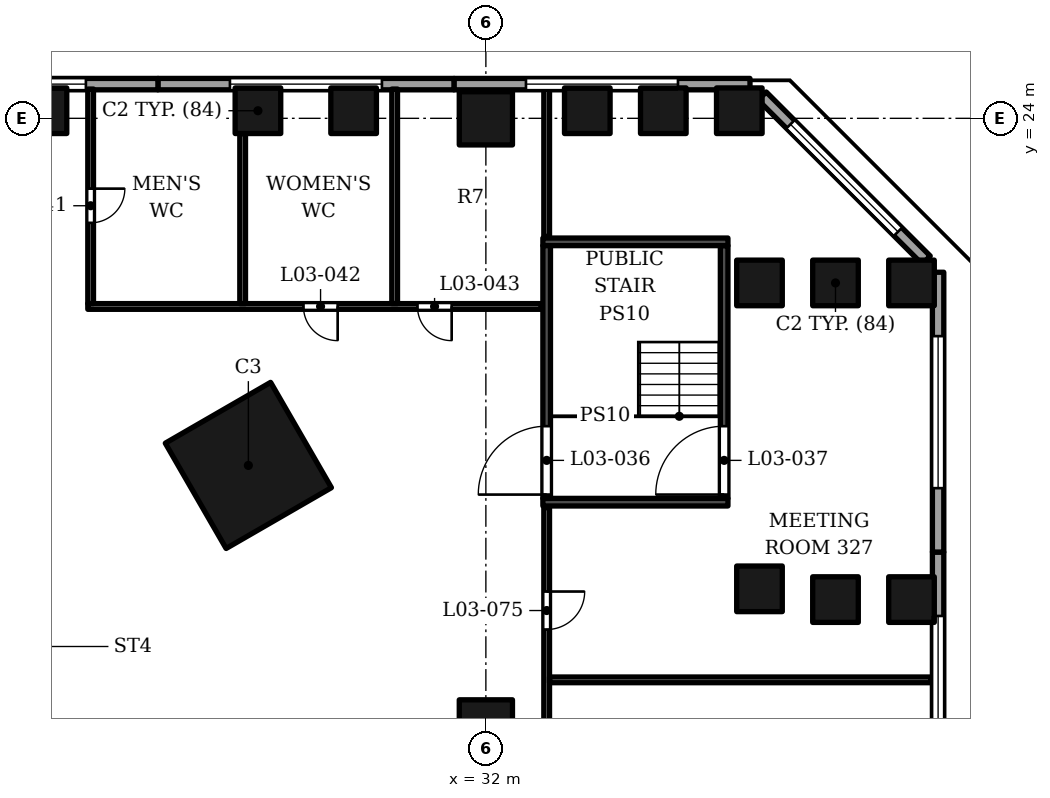
"""IFC4 building model, lengths in metres.
Left out: names, types, materials, properties, quantities, classifications, styles, units other than length and angle.
Written with IfcOpenShell. Run it as: python <this file> out.ifc"""

import sys

from ifc_helpers import new_model, si_unit, direction, frame, frame_2d, origin, origin_2d, place, context, subcontext, project, spatial, rectangle, extrude, element, fill, save


model = new_model("IFC4")
c1 = context("Model", 3, precision=1e-05, world=origin(), true_north=direction((0.0, 1.0)))
c2 = subcontext(c1, "Body", "Model", "MODEL_VIEW")
j1 = project(units=[si_unit("LENGTHUNIT", "METRE"), si_unit("PLANEANGLEUNIT", "RADIAN")], contexts=[c1])
p1 = place(None, origin())
s1 = spatial("IfcSite", under=j1, at=p1, CompositionType="ELEMENT")
p2 = place(p1, origin())
s2 = spatial("IfcBuilding", under=s1, at=p2, CompositionType="ELEMENT")
p3 = place(p2, frame((0.0, 0.0, 29.0)))
s3 = spatial("IfcBuildingStorey", under=s2, at=p3, CompositionType="ELEMENT", Elevation=29.0)
for number, where, z_axis, x_axis in (
    (1, (32.0, 8.0, 0.0), (0.0, 0.0, 1.0), (1.0, 0.0, 0.0)),
    (2, (32.0, 24.0, 0.0), (0.0, 0.0, 1.0), (1.0, 0.0, 0.0)),
):
    element("IfcColumn", number, at=place(p3, frame(where, z_axis=z_axis, x_axis=x_axis)), inside=s3, PredefinedType="COLUMN", context=c2, shape_type="SweptSolid", body=[
        extrude(rectangle(XDim=1.4, YDim=1.4, at=origin_2d()), origin(), (0.0, 0.0, 1.0), 5.5),
    ])
for number, where, z_axis, x_axis in (
    (3, (34.669, 24.2, 0.0), (0.0, 0.0, 1.0), (1.0, 0.0, 0.0)),
    (4, (39.2, 19.669, 0.0), (0.0, 0.0, 1.0), (1.0, 0.0, 0.0)),
    (5, (26.002, 24.2, 0.0), (0.0, 0.0, 1.0), (1.0, 0.0, 0.0)),
    (6, (39.2, 11.62, 0.0), (0.0, 0.0, 1.0), (1.0, 0.0, 0.0)),
    (7, (36.669, 24.2, 0.0), (0.0, 0.0, 1.0), (1.0, 0.0, 0.0)),
    (8, (41.2, 19.669, 0.0), (0.0, 0.0, 1.0), (1.0, 0.0, 0.0)),
    (9, (20.372, 24.2, 0.0), (0.0, 0.0, 1.0), (1.0, 0.0, 0.0)),
    (10, (28.52, 24.2, 0.0), (0.0, 0.0, 1.0), (1.0, 0.0, 0.0)),
    (11, (41.2, 11.337, 0.0), (0.0, 0.0, 1.0), (1.0, 0.0, 0.0)),
    (12, (38.669, 24.2, 0.0), (0.0, 0.0, 1.0), (1.0, 0.0, 0.0)),
    (13, (43.2, 19.669, 0.0), (0.0, 0.0, 1.0), (1.0, 0.0, 0.0)),
    (14, (43.2, 11.337, 0.0), (0.0, 0.0, 1.0), (1.0, 0.0, 0.0)),
):
    element("IfcColumn", number, at=place(p3, frame(where, z_axis=z_axis, x_axis=x_axis)), inside=s3, PredefinedType="COLUMN", context=c2, shape_type="SweptSolid", body=[
        extrude(rectangle(XDim=1.2, YDim=1.2, at=origin_2d()), origin(), (0.0, 0.0, 1.0), 5.5),
    ])
p4 = place(p3, frame((25.75, 14.867, 0.0), z_axis=(0.0, 0.0, 1.0), x_axis=(-0.866025386331, -0.50000003023, 0.0)))
e15 = element("IfcColumn", 15, at=p4, inside=s3, PredefinedType="COLUMN", context=c2, shape_type="SweptSolid", body=[
    extrude(rectangle(XDim=3.2, YDim=3.2, at=origin_2d()), origin(), (0.0, 0.0, 1.0), 5.5),
])
p5 = place(p3, frame((43.9, 5.225, 0.0), z_axis=(0.0, 0.0, 1.0), x_axis=(0.0, 1.0, 0.0)))
e16 = element("IfcWall", 16, at=p5, inside=s3, PredefinedType="SOLIDWALL", context=c2, shape_type="SweptSolid", body=[
    extrude(rectangle(XDim=7.362, YDim=0.3, at=frame_2d((3.681, 0.0))), origin(), (0.0, 0.0, 1.0), 4.1),
])
p6 = place(p5, frame((1.681, 0.0, 1.0)))
e17 = element("IfcOpeningElement", 17, at=p6, cuts=e16, PredefinedType="OPENING", context=c2, shape_type="SweptSolid", body=[
    extrude(rectangle(XDim=4.0, YDim=1.8, at=frame_2d((2.0, 0.9))), frame((0.0, 0.16, 0.0), z_axis=(0.0, -1.0, 0.0), x_axis=(1.0, 0.0, 0.0)), (0.0, 0.0, 1.0), 0.32),
])
p7 = place(p3, frame((43.9, 12.587, 0.0), z_axis=(0.0, 0.0, 1.0), x_axis=(0.0, 1.0, 0.0)))
e18 = element("IfcWall", 18, at=p7, inside=s3, PredefinedType="SOLIDWALL", context=c2, shape_type="SweptSolid", body=[
    extrude(rectangle(XDim=7.363, YDim=0.3, at=frame_2d((3.681, 0.0))), origin(), (0.0, 0.0, 1.0), 4.1),
])
p8 = place(p7, frame((1.681, 0.0, 1.0)))
e19 = element("IfcOpeningElement", 19, at=p8, cuts=e18, PredefinedType="OPENING", context=c2, shape_type="SweptSolid", body=[
    extrude(rectangle(XDim=4.0, YDim=1.8, at=frame_2d((2.0, 0.9))), frame((0.0, 0.16, 0.0), z_axis=(0.0, -1.0, 0.0), x_axis=(1.0, 0.0, 0.0)), (0.0, 0.0, 1.0), 0.32),
])
p9 = place(p3, frame((43.588, 20.271, 0.0), z_axis=(0.0, 0.0, 1.0), x_axis=(-0.707106781187, 0.707106781187, 0.0)))
e20 = element("IfcWall", 20, at=p9, inside=s3, PredefinedType="SOLIDWALL", context=c2, shape_type="SweptSolid", body=[
    extrude(rectangle(XDim=6.105, YDim=0.3, at=frame_2d((3.052, 0.0))), origin(), (0.0, 0.0, 1.0), 4.1),
])
p10 = place(p9, frame((1.052, 0.0, 1.0)))
e21 = element("IfcOpeningElement", 21, at=p10, cuts=e20, PredefinedType="OPENING", context=c2, shape_type="SweptSolid", body=[
    extrude(rectangle(XDim=4.0, YDim=1.8, at=frame_2d((2.0, 0.9))), frame((0.0, 0.16, 0.0), z_axis=(0.0, -1.0, 0.0), x_axis=(1.0, 0.0, 0.0)), (0.0, 0.0, 1.0), 0.32),
])
p11 = place(p3, frame((38.95, 24.9, 0.0), z_axis=(0.0, 0.0, 1.0), x_axis=(-1.0, 0.0, 0.0)))
e22 = element("IfcWall", 22, at=p11, inside=s3, PredefinedType="SOLIDWALL", context=c2, shape_type="SweptSolid", body=[
    extrude(rectangle(XDim=7.79, YDim=0.3, at=frame_2d((3.895, 0.0))), origin(), (0.0, 0.0, 1.0), 4.1),
])
p12 = place(p11, frame((1.895, 0.0, 1.0)))
e23 = element("IfcOpeningElement", 23, at=p12, cuts=e22, PredefinedType="OPENING", context=c2, shape_type="SweptSolid", body=[
    extrude(rectangle(XDim=4.0, YDim=1.8, at=frame_2d((2.0, 0.9))), frame((0.0, 0.16, 0.0), z_axis=(0.0, -1.0, 0.0), x_axis=(1.0, 0.0, 0.0)), (0.0, 0.0, 1.0), 0.32),
])
p13 = place(p3, frame((31.16, 24.9, 0.0), z_axis=(0.0, 0.0, 1.0), x_axis=(-1.0, 0.0, 0.0)))
e24 = element("IfcWall", 24, at=p13, inside=s3, PredefinedType="SOLIDWALL", context=c2, shape_type="SweptSolid", body=[
    extrude(rectangle(XDim=7.79, YDim=0.3, at=frame_2d((3.895, 0.0))), origin(), (0.0, 0.0, 1.0), 4.1),
])
p14 = place(p13, frame((1.895, 0.0, 1.0)))
e25 = element("IfcOpeningElement", 25, at=p14, cuts=e24, PredefinedType="OPENING", context=c2, shape_type="SweptSolid", body=[
    extrude(rectangle(XDim=4.0, YDim=1.8, at=frame_2d((2.0, 0.9))), frame((0.0, 0.16, 0.0), z_axis=(0.0, -1.0, 0.0), x_axis=(1.0, 0.0, 0.0)), (0.0, 0.0, 1.0), 0.32),
])
p15 = place(p3, frame((23.37, 24.9, 0.0), z_axis=(0.0, 0.0, 1.0), x_axis=(-1.0, 0.0, 0.0)))
e26 = element("IfcWall", 26, at=p15, inside=s3, PredefinedType="SOLIDWALL", context=c2, shape_type="SweptSolid", body=[
    extrude(rectangle(XDim=7.79, YDim=0.3, at=frame_2d((3.895, 0.0))), origin(), (0.0, 0.0, 1.0), 4.1),
])
p16 = place(p15, frame((1.895, 0.0, 1.0)))
e27 = element("IfcOpeningElement", 27, at=p16, cuts=e26, PredefinedType="OPENING", context=c2, shape_type="SweptSolid", body=[
    extrude(rectangle(XDim=4.0, YDim=1.8, at=frame_2d((2.0, 0.9))), frame((0.0, 0.16, 0.0), z_axis=(0.0, -1.0, 0.0), x_axis=(1.0, 0.0, 0.0)), (0.0, 0.0, 1.0), 0.32),
])
p17 = place(p3, frame((43.85, 5.302, 5.5), z_axis=(0.0, 0.0, 1.0), x_axis=(0.0, 1.0, 0.0)))
e28 = element("IfcWall", 28, at=p17, inside=s3, PredefinedType="PARAPET", context=c2, shape_type="SweptSolid", body=[
    extrude(rectangle(XDim=14.698, YDim=0.3, at=frame_2d((7.349, 0.0))), origin(), (0.0, 0.0, 1.0), 1.1),
])
p18 = place(p3, frame((43.745, 20.042, 5.5), z_axis=(0.0, 0.0, 1.0), x_axis=(-0.70708898898, 0.707124572946, 0.0)))
e29 = element("IfcWall", 29, at=p18, inside=s3, PredefinedType="PARAPET", context=c2, shape_type="SweptSolid", body=[
    extrude(rectangle(XDim=6.861, YDim=0.3, at=frame_2d((3.431, 0.0))), origin(), (0.0, 0.0, 1.0), 1.1),
])
p19 = place(p3, frame((38.79, 24.85, 5.5), z_axis=(0.0, 0.0, 1.0), x_axis=(-1.0, 0.0, 0.0)))
e30 = element("IfcWall", 30, at=p19, inside=s3, PredefinedType="PARAPET", context=c2, shape_type="SweptSolid", body=[
    extrude(rectangle(XDim=1.04, YDim=0.3, at=frame_2d((0.52, 0.0))), origin(), (0.0, 0.0, 1.0), 1.1),
])
for number, where, z_axis, x_axis in (
    (31, (33.5, 13.9, 0.0), (0.0, 0.0, 1.0), (1.0, 0.0, 0.0)),
    (32, (33.5, 20.75, 0.0), (0.0, 0.0, 1.0), (1.0, 0.0, 0.0)),
):
    element("IfcWall", number, at=place(p3, frame(where, z_axis=z_axis, x_axis=x_axis)), inside=s3, PredefinedType="SOLIDWALL", context=c2, shape_type="SweptSolid", body=[
        extrude(rectangle(XDim=4.87, YDim=0.2, at=frame_2d((2.435, 0.0))), origin(), (0.0, 0.0, 1.0), 5.05),
    ])
p20 = place(p3, frame((33.6, 14.0, 0.0), z_axis=(0.0, 0.0, 1.0), x_axis=(0.0, 1.0, 0.0)))
e33 = element("IfcWall", 33, at=p20, inside=s3, PredefinedType="SOLIDWALL", context=c2, shape_type="SweptSolid", body=[
    extrude(rectangle(XDim=6.65, YDim=0.2, at=frame_2d((3.325, 0.0))), origin(), (0.0, 0.0, 1.0), 5.05),
])
p21 = place(p20, frame((0.1, 0.0, 0.0)))
e34 = element("IfcOpeningElement", 34, at=p21, cuts=e33, PredefinedType="OPENING", context=c2, shape_type="SweptSolid", body=[
    extrude(rectangle(XDim=1.8, YDim=2.4, at=frame_2d((0.9, 1.2))), frame((0.0, 0.11, 0.0), z_axis=(0.0, -1.0, 0.0), x_axis=(1.0, 0.0, 0.0)), (0.0, 0.0, 1.0), 0.22),
])
p22 = place(p3, frame((38.27, 14.0, 0.0), z_axis=(0.0, 0.0, 1.0), x_axis=(0.0, 1.0, 0.0)))
e35 = element("IfcWall", 35, at=p22, inside=s3, PredefinedType="SOLIDWALL", context=c2, shape_type="SweptSolid", body=[
    extrude(rectangle(XDim=6.65, YDim=0.2, at=frame_2d((3.325, 0.0))), origin(), (0.0, 0.0, 1.0), 5.05),
])
p23 = place(p22, frame((0.1, 0.0, 0.0)))
e36 = element("IfcOpeningElement", 36, at=p23, cuts=e35, PredefinedType="OPENING", context=c2, shape_type="SweptSolid", body=[
    extrude(rectangle(XDim=1.8, YDim=2.4, at=frame_2d((0.9, 1.2))), frame((0.0, 0.11, 0.0), z_axis=(0.0, -1.0, 0.0), x_axis=(1.0, 0.0, 0.0)), (0.0, 0.0, 1.0), 0.22),
])
p24 = place(p3, frame((33.6, 4.69, 0.0), z_axis=(0.0, 0.0, 1.0), x_axis=(0.0, 1.0, 0.0)))
e37 = element("IfcWall", 37, at=p24, inside=s3, PredefinedType="PARTITIONING", context=c2, shape_type="SweptSolid", body=[
    extrude(rectangle(XDim=9.07, YDim=0.15, at=frame_2d((4.535, 0.0))), origin(), (0.0, 0.0, 1.0), 3.85),
])
p25 = place(p24, frame((0.385, 0.0, 0.0)))
e38 = element("IfcOpeningElement", 38, at=p25, cuts=e37, PredefinedType="OPENING", context=c2, shape_type="SweptSolid", body=[
    extrude(rectangle(XDim=1.0, YDim=2.1, at=frame_2d((0.5, 1.05))), frame((0.0, 0.085, 0.0), z_axis=(0.0, -1.0, 0.0), x_axis=(1.0, 0.0, 0.0)), (0.0, 0.0, 1.0), 0.17),
])
p26 = place(p24, frame((5.859, 0.0, 0.0)))
e39 = element("IfcOpeningElement", 39, at=p26, cuts=e37, PredefinedType="OPENING", context=c2, shape_type="SweptSolid", body=[
    extrude(rectangle(XDim=1.0, YDim=2.1, at=frame_2d((0.5, 1.05))), frame((0.0, 0.085, 0.0), z_axis=(0.0, -1.0, 0.0), x_axis=(1.0, 0.0, 0.0)), (0.0, 0.0, 1.0), 0.17),
])
p27 = place(p3, frame((33.675, 9.225, 0.0), z_axis=(0.0, 0.0, 1.0), x_axis=(1.0, 0.0, 0.0)))
e40 = element("IfcWall", 40, at=p27, inside=s3, PredefinedType="PARTITIONING", context=c2, shape_type="SweptSolid", body=[
    extrude(rectangle(XDim=10.045, YDim=0.15, at=frame_2d((5.022, 0.0))), origin(), (0.0, 0.0, 1.0), 4.15),
])
p28 = place(p3, frame((21.525, 19.05, 0.0), z_axis=(0.0, 0.0, 1.0), x_axis=(1.0, 0.0, 0.0)))
e41 = element("IfcWall", 41, at=p28, inside=s3, PredefinedType="PARTITIONING", context=c2, shape_type="SweptSolid", body=[
    extrude(rectangle(XDim=11.935, YDim=0.15, at=frame_2d((5.968, 0.0))), origin(), (0.0, 0.0, 1.0), 3.85),
])
p29 = place(p28, frame((5.675, 0.0, 0.0)))
e42 = element("IfcOpeningElement", 42, at=p29, cuts=e41, PredefinedType="OPENING", context=c2, shape_type="SweptSolid", body=[
    extrude(rectangle(XDim=0.9, YDim=2.1, at=frame_2d((0.45, 1.05))), frame((0.0, 0.085, 0.0), z_axis=(0.0, -1.0, 0.0), x_axis=(1.0, 0.0, 0.0)), (0.0, 0.0, 1.0), 0.17),
])
p30 = place(p28, frame((8.675, 0.0, 0.0)))
e43 = element("IfcOpeningElement", 43, at=p30, cuts=e41, PredefinedType="OPENING", context=c2, shape_type="SweptSolid", body=[
    extrude(rectangle(XDim=0.9, YDim=2.1, at=frame_2d((0.45, 1.05))), frame((0.0, 0.085, 0.0), z_axis=(0.0, -1.0, 0.0), x_axis=(1.0, 0.0, 0.0)), (0.0, 0.0, 1.0), 0.17),
])
p31 = place(p3, frame((21.6, 19.125, 0.0), z_axis=(0.0, 0.0, 1.0), x_axis=(0.0, 1.0, 0.0)))
e44 = element("IfcWall", 44, at=p31, inside=s3, PredefinedType="PARTITIONING", context=c2, shape_type="SweptSolid", body=[
    extrude(rectangle(XDim=5.645, YDim=0.15, at=frame_2d((2.823, 0.0))), origin(), (0.0, 0.0, 1.0), 3.85),
])
p32 = place(p31, frame((2.125, 0.0, 0.0)))
e45 = element("IfcOpeningElement", 45, at=p32, cuts=e44, PredefinedType="OPENING", context=c2, shape_type="SweptSolid", body=[
    extrude(rectangle(XDim=0.9, YDim=2.1, at=frame_2d((0.45, 1.05))), frame((0.0, 0.085, 0.0), z_axis=(0.0, -1.0, 0.0), x_axis=(1.0, 0.0, 0.0)), (0.0, 0.0, 1.0), 0.17),
])
p33 = place(p3, frame((25.6, 19.125, 0.0), z_axis=(0.0, 0.0, 1.0), x_axis=(0.0, 1.0, 0.0)))
e46 = element("IfcWall", 46, at=p33, inside=s3, PredefinedType="PARTITIONING", context=c2, shape_type="SweptSolid", body=[
    extrude(rectangle(XDim=4.475, YDim=0.15, at=frame_2d((2.238, 0.0))), origin(), (0.0, 0.0, 1.0), 5.05),
])
p34 = place(p3, frame((29.6, 19.125, 0.0), z_axis=(0.0, 0.0, 1.0), x_axis=(0.0, 1.0, 0.0)))
e47 = element("IfcWall", 47, at=p34, inside=s3, PredefinedType="PARTITIONING", context=c2, shape_type="SweptSolid", body=[
    extrude(rectangle(XDim=5.645, YDim=0.15, at=frame_2d((2.823, 0.0))), origin(), (0.0, 0.0, 1.0), 3.85),
])
p35 = place(p3, frame((33.6, 20.89, 0.0), z_axis=(0.0, 0.0, 1.0), x_axis=(0.0, 1.0, 0.0)))
e48 = element("IfcWall", 48, at=p35, inside=s3, PredefinedType="PARTITIONING", context=c2, shape_type="SweptSolid", body=[
    extrude(rectangle(XDim=3.88, YDim=0.15, at=frame_2d((1.94, 0.0))), origin(), (0.0, 0.0, 1.0), 5.05),
])
p36 = place(p6, origin())
e49 = element("IfcWindow", 49, at=p36, inside=s3, PartitioningType="SINGLE_PANEL", PredefinedType="WINDOW", context=c2, shape_type="SweptSolid", body=[
    extrude(rectangle(XDim=4.0, YDim=1.8, at=frame_2d((2.0, 0.9))), frame((0.0, 0.03, 0.0), z_axis=(0.0, -1.0, 0.0), x_axis=(1.0, 0.0, 0.0)), (0.0, 0.0, 1.0), 0.06),
])
fill(e17, e49)
p37 = place(p8, origin())
e50 = element("IfcWindow", 50, at=p37, inside=s3, PartitioningType="SINGLE_PANEL", PredefinedType="WINDOW", context=c2, shape_type="SweptSolid", body=[
    extrude(rectangle(XDim=4.0, YDim=1.8, at=frame_2d((2.0, 0.9))), frame((0.0, 0.03, 0.0), z_axis=(0.0, -1.0, 0.0), x_axis=(1.0, 0.0, 0.0)), (0.0, 0.0, 1.0), 0.06),
])
fill(e19, e50)
p38 = place(p10, origin())
e51 = element("IfcWindow", 51, at=p38, inside=s3, PartitioningType="SINGLE_PANEL", PredefinedType="WINDOW", context=c2, shape_type="SweptSolid", body=[
    extrude(rectangle(XDim=4.0, YDim=1.8, at=frame_2d((2.0, 0.9))), frame((0.0, 0.03, 0.0), z_axis=(0.0, -1.0, 0.0), x_axis=(1.0, 0.0, 0.0)), (0.0, 0.0, 1.0), 0.06),
])
fill(e21, e51)
p39 = place(p12, origin())
e52 = element("IfcWindow", 52, at=p39, inside=s3, PartitioningType="SINGLE_PANEL", PredefinedType="WINDOW", context=c2, shape_type="SweptSolid", body=[
    extrude(rectangle(XDim=4.0, YDim=1.8, at=frame_2d((2.0, 0.9))), frame((0.0, 0.03, 0.0), z_axis=(0.0, -1.0, 0.0), x_axis=(1.0, 0.0, 0.0)), (0.0, 0.0, 1.0), 0.06),
])
fill(e23, e52)
p40 = place(p14, origin())
e53 = element("IfcWindow", 53, at=p40, inside=s3, PartitioningType="SINGLE_PANEL", PredefinedType="WINDOW", context=c2, shape_type="SweptSolid", body=[
    extrude(rectangle(XDim=4.0, YDim=1.8, at=frame_2d((2.0, 0.9))), frame((0.0, 0.03, 0.0), z_axis=(0.0, -1.0, 0.0), x_axis=(1.0, 0.0, 0.0)), (0.0, 0.0, 1.0), 0.06),
])
fill(e25, e53)
p41 = place(p16, origin())
e54 = element("IfcWindow", 54, at=p41, inside=s3, PartitioningType="SINGLE_PANEL", PredefinedType="WINDOW", context=c2, shape_type="SweptSolid", body=[
    extrude(rectangle(XDim=4.0, YDim=1.8, at=frame_2d((2.0, 0.9))), frame((0.0, 0.03, 0.0), z_axis=(0.0, -1.0, 0.0), x_axis=(1.0, 0.0, 0.0)), (0.0, 0.0, 1.0), 0.06),
])
fill(e27, e54)
p42 = place(p21, origin())
e55 = element("IfcDoor", 55, at=p42, inside=s3, OperationType="DOUBLE_DOOR_SINGLE_SWING", PredefinedType="DOOR", context=c2, shape_type="SweptSolid", body=[
    extrude(rectangle(XDim=1.8, YDim=2.4, at=frame_2d((0.9, 1.2))), frame((0.0, 0.025, 0.0), z_axis=(0.0, -1.0, 0.0), x_axis=(1.0, 0.0, 0.0)), (0.0, 0.0, 1.0), 0.05),
])
fill(e34, e55)
p43 = place(p23, origin())
e56 = element("IfcDoor", 56, at=p43, inside=s3, OperationType="DOUBLE_DOOR_SINGLE_SWING", PredefinedType="DOOR", context=c2, shape_type="SweptSolid", body=[
    extrude(rectangle(XDim=1.8, YDim=2.4, at=frame_2d((0.9, 1.2))), frame((0.0, 0.025, 0.0), z_axis=(0.0, -1.0, 0.0), x_axis=(1.0, 0.0, 0.0)), (0.0, 0.0, 1.0), 0.05),
])
fill(e36, e56)
p44 = place(p32, origin())
e57 = element("IfcDoor", 57, at=p44, inside=s3, OperationType="SINGLE_SWING_RIGHT", PredefinedType="DOOR", context=c2, shape_type="SweptSolid", body=[
    extrude(rectangle(XDim=0.9, YDim=2.1, at=frame_2d((0.45, 1.05))), frame((0.0, 0.025, 0.0), z_axis=(0.0, -1.0, 0.0), x_axis=(1.0, 0.0, 0.0)), (0.0, 0.0, 1.0), 0.05),
])
fill(e45, e57)
p45 = place(p29, origin())
e58 = element("IfcDoor", 58, at=p45, inside=s3, OperationType="SINGLE_SWING_RIGHT", PredefinedType="DOOR", context=c2, shape_type="SweptSolid", body=[
    extrude(rectangle(XDim=0.9, YDim=2.1, at=frame_2d((0.45, 1.05))), frame((0.0, 0.025, 0.0), z_axis=(0.0, -1.0, 0.0), x_axis=(1.0, 0.0, 0.0)), (0.0, 0.0, 1.0), 0.05),
])
fill(e42, e58)
p46 = place(p30, origin())
e59 = element("IfcDoor", 59, at=p46, inside=s3, OperationType="SINGLE_SWING_RIGHT", PredefinedType="DOOR", context=c2, shape_type="SweptSolid", body=[
    extrude(rectangle(XDim=0.9, YDim=2.1, at=frame_2d((0.45, 1.05))), frame((0.0, 0.025, 0.0), z_axis=(0.0, -1.0, 0.0), x_axis=(1.0, 0.0, 0.0)), (0.0, 0.0, 1.0), 0.05),
])
fill(e43, e59)
p47 = place(p26, origin())
e60 = element("IfcDoor", 60, at=p47, inside=s3, OperationType="SINGLE_SWING_RIGHT", PredefinedType="DOOR", context=c2, shape_type="SweptSolid", body=[
    extrude(rectangle(XDim=1.0, YDim=2.1, at=frame_2d((0.5, 1.05))), frame((0.0, 0.025, 0.0), z_axis=(0.0, -1.0, 0.0), x_axis=(1.0, 0.0, 0.0)), (0.0, 0.0, 1.0), 0.05),
])
fill(e39, e60)
save(model, sys.argv[1])
